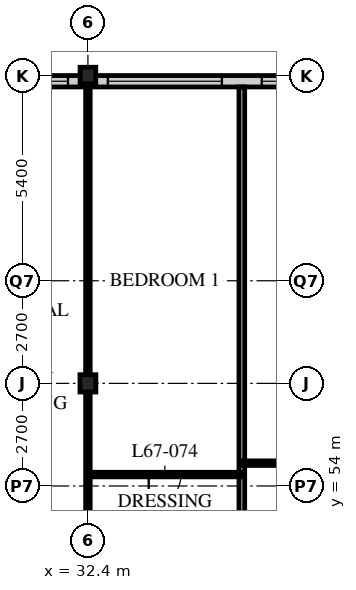
"""IFC4 building model, lengths in metres.
Left out: names, types, materials, properties, quantities, classifications, styles, units other than length and angle.
Written with IfcOpenShell. Run it as: python <this file> out.ifc"""

import sys

from ifc_helpers import new_model, si_unit, direction, frame, frame_2d, origin, origin_2d, place, context, subcontext, project, spatial, rectangle, i_section, extrude, element, fill, save


model = new_model("IFC4")
c1 = context("Model", 3, precision=1e-05, world=origin(), true_north=direction((0.0, 1.0)))
c2 = subcontext(c1, "Body", "Model", "MODEL_VIEW")
j1 = project(units=[si_unit("LENGTHUNIT", "METRE"), si_unit("PLANEANGLEUNIT", "RADIAN")], contexts=[c1])
p1 = place(None, origin())
s1 = spatial("IfcSite", under=j1, at=p1, CompositionType="ELEMENT")
p2 = place(p1, origin())
s2 = spatial("IfcBuilding", under=s1, at=p2, CompositionType="ELEMENT")
p3 = place(p2, frame((0.0, 0.0, 261.9)))
s3 = spatial("IfcBuildingStorey", under=s2, at=p3, CompositionType="ELEMENT", Elevation=261.9)
p4 = place(p3, frame((32.4, 56.7, 0.0), z_axis=(0.0, 0.0, 1.0), x_axis=(1.0, 0.0, 0.0)))
e1 = element("IfcColumn", 1, at=p4, inside=s3, PredefinedType="COLUMN", context=c2, shape_type="SweptSolid", body=[
    extrude(i_section(OverallWidth=0.418, OverallDepth=0.456, WebThickness=0.042, FlangeThickness=0.067, FilletRadius=0.015, at=origin_2d()), origin(), (0.0, 0.0, 1.0), 3.9),
])
p5 = place(p3, frame((32.4, 64.8, 0.0), z_axis=(0.0, 0.0, 1.0), x_axis=(1.0, 0.0, 0.0)))
e2 = element("IfcColumn", 2, at=p5, inside=s3, PredefinedType="COLUMN", context=c2, shape_type="SweptSolid", body=[
    extrude(i_section(OverallWidth=0.412, OverallDepth=0.437, WebThickness=0.036, FlangeThickness=0.058, FilletRadius=0.015, at=origin_2d()), origin(), (0.0, 0.0, 1.0), 3.9),
])
p6 = place(p3, frame((48.3, 64.65, 0.0), z_axis=(0.0, 0.0, 1.0), x_axis=(-1.0, 0.0, 0.0)))
e3 = element("IfcWall", 3, at=p6, inside=s3, PredefinedType="SOLIDWALL", context=c2, shape_type="SweptSolid", body=[
    extrude(rectangle(XDim=40.2, YDim=0.3, at=frame_2d((20.1, 0.0))), origin(), (0.0, 0.0, 1.0), 3.69),
])
p7 = place(p6, frame((0.225, 0.0, 0.6)))
e4 = element("IfcOpeningElement", 4, at=p7, cuts=e3, PredefinedType="OPENING", context=c2, shape_type="SweptSolid", body=[
    extrude(rectangle(XDim=3.0, YDim=2.4, at=frame_2d((1.5, 1.2))), frame((0.0, 0.16, 0.0), z_axis=(0.0, -1.0, 0.0), x_axis=(1.0, 0.0, 0.0)), (0.0, 0.0, 1.0), 0.32),
])
p8 = place(p6, frame((4.275, 0.0, 0.6)))
e5 = element("IfcOpeningElement", 5, at=p8, cuts=e3, PredefinedType="OPENING", context=c2, shape_type="SweptSolid", body=[
    extrude(rectangle(XDim=3.0, YDim=2.4, at=frame_2d((1.5, 1.2))), frame((0.0, 0.16, 0.0), z_axis=(0.0, -1.0, 0.0), x_axis=(1.0, 0.0, 0.0)), (0.0, 0.0, 1.0), 0.32),
])
p9 = place(p6, frame((8.325, 0.0, 0.6)))
e6 = element("IfcOpeningElement", 6, at=p9, cuts=e3, PredefinedType="OPENING", context=c2, shape_type="SweptSolid", body=[
    extrude(rectangle(XDim=3.0, YDim=2.4, at=frame_2d((1.5, 1.2))), frame((0.0, 0.16, 0.0), z_axis=(0.0, -1.0, 0.0), x_axis=(1.0, 0.0, 0.0)), (0.0, 0.0, 1.0), 0.32),
])
p10 = place(p6, frame((12.375, 0.0, 0.6)))
e7 = element("IfcOpeningElement", 7, at=p10, cuts=e3, PredefinedType="OPENING", context=c2, shape_type="SweptSolid", body=[
    extrude(rectangle(XDim=3.0, YDim=2.4, at=frame_2d((1.5, 1.2))), frame((0.0, 0.16, 0.0), z_axis=(0.0, -1.0, 0.0), x_axis=(1.0, 0.0, 0.0)), (0.0, 0.0, 1.0), 0.32),
])
p11 = place(p6, frame((16.425, 0.0, 0.6)))
e8 = element("IfcOpeningElement", 8, at=p11, cuts=e3, PredefinedType="OPENING", context=c2, shape_type="SweptSolid", body=[
    extrude(rectangle(XDim=3.0, YDim=2.4, at=frame_2d((1.5, 1.2))), frame((0.0, 0.16, 0.0), z_axis=(0.0, -1.0, 0.0), x_axis=(1.0, 0.0, 0.0)), (0.0, 0.0, 1.0), 0.32),
])
p12 = place(p6, frame((20.475, 0.0, 0.6)))
e9 = element("IfcOpeningElement", 9, at=p12, cuts=e3, PredefinedType="OPENING", context=c2, shape_type="SweptSolid", body=[
    extrude(rectangle(XDim=3.0, YDim=2.4, at=frame_2d((1.5, 1.2))), frame((0.0, 0.16, 0.0), z_axis=(0.0, -1.0, 0.0), x_axis=(1.0, 0.0, 0.0)), (0.0, 0.0, 1.0), 0.32),
])
p13 = place(p6, frame((24.525, 0.0, 0.6)))
e10 = element("IfcOpeningElement", 10, at=p13, cuts=e3, PredefinedType="OPENING", context=c2, shape_type="SweptSolid", body=[
    extrude(rectangle(XDim=3.0, YDim=2.4, at=frame_2d((1.5, 1.2))), frame((0.0, 0.16, 0.0), z_axis=(0.0, -1.0, 0.0), x_axis=(1.0, 0.0, 0.0)), (0.0, 0.0, 1.0), 0.32),
])
p14 = place(p6, frame((28.575, 0.0, 0.6)))
e11 = element("IfcOpeningElement", 11, at=p14, cuts=e3, PredefinedType="OPENING", context=c2, shape_type="SweptSolid", body=[
    extrude(rectangle(XDim=3.0, YDim=2.4, at=frame_2d((1.5, 1.2))), frame((0.0, 0.16, 0.0), z_axis=(0.0, -1.0, 0.0), x_axis=(1.0, 0.0, 0.0)), (0.0, 0.0, 1.0), 0.32),
])
p15 = place(p6, frame((32.625, 0.0, 0.6)))
e12 = element("IfcOpeningElement", 12, at=p15, cuts=e3, PredefinedType="OPENING", context=c2, shape_type="SweptSolid", body=[
    extrude(rectangle(XDim=3.0, YDim=2.4, at=frame_2d((1.5, 1.2))), frame((0.0, 0.16, 0.0), z_axis=(0.0, -1.0, 0.0), x_axis=(1.0, 0.0, 0.0)), (0.0, 0.0, 1.0), 0.32),
])
p16 = place(p6, frame((36.675, 0.0, 0.6)))
e13 = element("IfcOpeningElement", 13, at=p16, cuts=e3, PredefinedType="OPENING", context=c2, shape_type="SweptSolid", body=[
    extrude(rectangle(XDim=3.0, YDim=2.4, at=frame_2d((1.5, 1.2))), frame((0.0, 0.16, 0.0), z_axis=(0.0, -1.0, 0.0), x_axis=(1.0, 0.0, 0.0)), (0.0, 0.0, 1.0), 0.32),
])
p17 = place(p3, frame((32.4, 51.0, 0.0), z_axis=(0.0, 0.0, 1.0), x_axis=(0.0, 1.0, 0.0)))
e14 = element("IfcWall", 14, at=p17, inside=s3, PredefinedType="PARTITIONING", context=c2, shape_type="SweptSolid", body=[
    extrude(rectangle(XDim=13.5, YDim=0.12, at=frame_2d((6.75, 0.0))), origin(), (0.0, 0.0, 1.0), 3.078),
])
p18 = place(p3, frame((36.45, 64.5, 0.0), z_axis=(0.0, 0.0, 1.0), x_axis=(0.0, -1.0, 0.0)))
e15 = element("IfcWall", 15, at=p18, inside=s3, PredefinedType="PARTITIONING", context=c2, shape_type="SweptSolid", body=[
    extrude(rectangle(XDim=15.9, YDim=0.15, at=frame_2d((7.95, 0.0))), origin(), (0.0, 0.0, 1.0), 3.69),
])
p19 = place(p3, frame((36.45, 54.6, 0.0), z_axis=(0.0, 0.0, 1.0), x_axis=(1.0, 0.0, 0.0)))
e16 = element("IfcWall", 16, at=p19, inside=s3, PredefinedType="PARTITIONING", context=c2, shape_type="SweptSolid", body=[
    extrude(rectangle(XDim=19.95, YDim=0.12, at=frame_2d((9.975, 0.0))), origin(), (0.0, 0.0, 1.0), 3.69),
])
p20 = place(p19, frame((1.675, 0.0, 0.0)))
e17 = element("IfcOpeningElement", 17, at=p20, cuts=e16, PredefinedType="OPENING", context=c2, shape_type="SweptSolid", body=[
    extrude(rectangle(XDim=0.85, YDim=2.1, at=frame_2d((0.425, 1.05))), frame((0.0, 0.07, 0.0), z_axis=(0.0, -1.0, 0.0), x_axis=(1.0, 0.0, 0.0)), (0.0, 0.0, 1.0), 0.14),
])
p21 = place(p3, frame((32.4, 54.3, 0.0), z_axis=(0.0, 0.0, 1.0), x_axis=(1.0, 0.0, 0.0)))
e18 = element("IfcWall", 18, at=p21, inside=s3, PredefinedType="PARTITIONING", context=c2, shape_type="SweptSolid", body=[
    extrude(rectangle(XDim=4.05, YDim=0.12, at=frame_2d((2.025, 0.0))), origin(), (0.0, 0.0, 1.0), 3.69),
])
p22 = place(p21, frame((1.6, 0.0, 0.0)))
e19 = element("IfcOpeningElement", 19, at=p22, cuts=e18, PredefinedType="OPENING", context=c2, shape_type="SweptSolid", body=[
    extrude(rectangle(XDim=0.85, YDim=2.1, at=frame_2d((0.425, 1.05))), frame((0.0, 0.07, 0.0), z_axis=(0.0, -1.0, 0.0), x_axis=(1.0, 0.0, 0.0)), (0.0, 0.0, 1.0), 0.14),
])
p23 = place(p9, origin())
e20 = element("IfcWindow", 20, at=p23, inside=s3, PartitioningType="SINGLE_PANEL", PredefinedType="WINDOW", context=c2, shape_type="SweptSolid", body=[
    extrude(rectangle(XDim=3.0, YDim=2.4, at=frame_2d((1.5, 1.2))), frame((0.0, 0.03, 0.0), z_axis=(0.0, -1.0, 0.0), x_axis=(1.0, 0.0, 0.0)), (0.0, 0.0, 1.0), 0.06),
])
fill(e6, e20)
p24 = place(p10, origin())
e21 = element("IfcWindow", 21, at=p24, inside=s3, PartitioningType="SINGLE_PANEL", PredefinedType="WINDOW", context=c2, shape_type="SweptSolid", body=[
    extrude(rectangle(XDim=3.0, YDim=2.4, at=frame_2d((1.5, 1.2))), frame((0.0, 0.03, 0.0), z_axis=(0.0, -1.0, 0.0), x_axis=(1.0, 0.0, 0.0)), (0.0, 0.0, 1.0), 0.06),
])
fill(e7, e21)
p25 = place(p11, origin())
e22 = element("IfcWindow", 22, at=p25, inside=s3, PartitioningType="SINGLE_PANEL", PredefinedType="WINDOW", context=c2, shape_type="SweptSolid", body=[
    extrude(rectangle(XDim=3.0, YDim=2.4, at=frame_2d((1.5, 1.2))), frame((0.0, 0.03, 0.0), z_axis=(0.0, -1.0, 0.0), x_axis=(1.0, 0.0, 0.0)), (0.0, 0.0, 1.0), 0.06),
])
fill(e8, e22)
p26 = place(p22, origin())
e23 = element("IfcDoor", 23, at=p26, inside=s3, OperationType="SINGLE_SWING_RIGHT", PredefinedType="DOOR", context=c2, shape_type="SweptSolid", body=[
    extrude(rectangle(XDim=0.85, YDim=2.1, at=frame_2d((0.425, 1.05))), frame((0.0, 0.025, 0.0), z_axis=(0.0, -1.0, 0.0), x_axis=(1.0, 0.0, 0.0)), (0.0, 0.0, 1.0), 0.05),
])
fill(e19, e23)
save(model, sys.argv[1])
